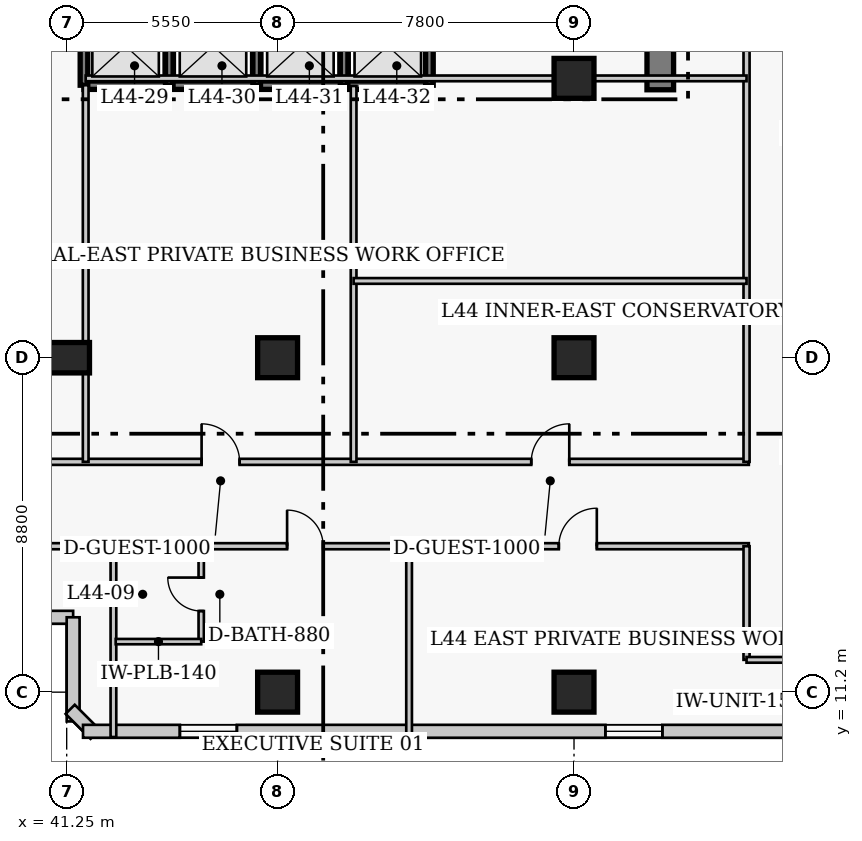
"""IFC4 building model, lengths in metres.
Left out: names, types, materials, properties, quantities, classifications, styles, units other than length and angle.
Written with IfcOpenShell. Run it as: python <this file> out.ifc"""

import sys

from ifc_helpers import new_model, si_unit, direction, frame, frame_2d, origin, origin_2d, place, context, subcontext, project, spatial, rectangle, extrude, element, fill, save


model = new_model("IFC4")
c1 = context("Model", 3, precision=1e-05, world=origin(), true_north=direction((0.0, 1.0)))
c2 = subcontext(c1, "Body", "Model", "MODEL_VIEW")
j1 = project(units=[si_unit("LENGTHUNIT", "METRE"), si_unit("PLANEANGLEUNIT", "RADIAN")], contexts=[c1])
p1 = place(None, origin())
s1 = spatial("IfcSite", under=j1, at=p1, CompositionType="ELEMENT")
p2 = place(p1, origin())
s2 = spatial("IfcBuilding", under=s1, at=p2, CompositionType="ELEMENT")
p3 = place(p2, frame((0.0, 0.0, 176.4)))
s3 = spatial("IfcBuildingStorey", under=s2, at=p3, CompositionType="ELEMENT", Elevation=176.4)
p4 = place(p3, frame((56.87, 27.05, 0.0), z_axis=(0.0, 0.0, 1.0), x_axis=(0.0, 1.0, 0.0)))
e1 = element("IfcWall", 1, at=p4, inside=s3, PredefinedType="SHEAR", context=c2, shape_type="SweptSolid", body=[
    extrude(rectangle(XDim=13.62, YDim=0.7, at=frame_2d((6.81, 0.0))), origin(), (0.0, 0.0, 1.0), 3.8),
])
p5 = place(p3, frame((41.25, 20.0, 0.0), z_axis=(0.0, 0.0, 1.0), x_axis=(1.0, 0.0, 0.0)))
e2 = element("IfcColumn", 2, at=p5, inside=s3, PredefinedType="COLUMN", context=c2, shape_type="SweptSolid", body=[
    extrude(rectangle(XDim=1.2, YDim=0.8, at=origin_2d()), origin(), (0.0, 0.0, 1.0), 3.8),
])
for number, where, z_axis, x_axis in (
    (3, (46.8, 11.2, 0.0), (0.0, 0.0, 1.0), (1.0, 0.0, 0.0)),
    (4, (46.8, 20.0, 0.0), (0.0, 0.0, 1.0), (1.0, 0.0, 0.0)),
    (5, (54.6, 11.2, 0.0), (0.0, 0.0, 1.0), (1.0, 0.0, 0.0)),
    (6, (54.6, 20.0, 0.0), (0.0, 0.0, 1.0), (1.0, 0.0, 0.0)),
    (7, (54.6, 27.35, 0.0), (0.0, 0.0, 1.0), (1.0, 0.0, 0.0)),
):
    element("IfcColumn", number, at=place(p3, frame(where, z_axis=z_axis, x_axis=x_axis)), inside=s3, PredefinedType="COLUMN", context=c2, shape_type="SweptSolid", body=[
        extrude(rectangle(XDim=1.05, YDim=1.05, at=origin_2d()), origin(), (0.0, 0.0, 1.0), 3.8),
    ])
p6 = place(p3, frame((36.58, 13.17, 0.0), z_axis=(0.0, 0.0, 1.0), x_axis=(1.0, 0.0, 0.0)))
e8 = element("IfcWall", 8, at=p6, inside=s3, PredefinedType="SOLIDWALL", context=c2, shape_type="SweptSolid", body=[
    extrude(rectangle(XDim=4.84, YDim=0.34, at=frame_2d((2.42, 0.0))), origin(), (0.0, 0.0, 1.0), 3.55),
])
p7 = place(p6, frame((1.67, 0.0, 0.85)))
e9 = element("IfcOpeningElement", 9, at=p7, cuts=e8, PredefinedType="OPENING", context=c2, shape_type="SweptSolid", body=[
    extrude(rectangle(XDim=1.5, YDim=1.75, at=frame_2d((0.75, 0.875))), frame((0.0, 0.18, 0.0), z_axis=(0.0, -1.0, 0.0), x_axis=(1.0, 0.0, 0.0)), (0.0, 0.0, 1.0), 0.36),
])
p8 = place(p3, frame((41.42, 13.17, 0.0), z_axis=(0.0, 0.0, 1.0), x_axis=(0.0, -1.0, 0.0)))
e10 = element("IfcWall", 10, at=p8, inside=s3, PredefinedType="SOLIDWALL", context=c2, shape_type="SweptSolid", body=[
    extrude(rectangle(XDim=2.74, YDim=0.34, at=frame_2d((1.37, 0.0))), origin(), (0.0, 0.0, 1.0), 3.55),
])
p9 = place(p3, frame((41.342, 10.749, 0.0), z_axis=(0.0, 0.0, 1.0), x_axis=(0.707106781187, -0.707106781187, 0.0)))
e11 = element("IfcWall", 11, at=p9, inside=s3, PredefinedType="SOLIDWALL", context=c2, shape_type="SweptSolid", body=[
    extrude(rectangle(XDim=0.929, YDim=0.34, at=frame_2d((0.464, 0.0))), origin(), (0.0, 0.0, 1.0), 3.55),
])
p10 = place(p3, frame((41.68, 10.17, 0.0), z_axis=(0.0, 0.0, 1.0), x_axis=(1.0, 0.0, 0.0)))
e12 = element("IfcWall", 12, at=p10, inside=s3, PredefinedType="SOLIDWALL", context=c2, shape_type="SweptSolid", body=[
    extrude(rectangle(XDim=26.69, YDim=0.34, at=frame_2d((13.345, 0.0))), origin(), (0.0, 0.0, 1.0), 3.55),
])
p11 = place(p10, frame((2.548, 0.0, 0.85)))
e13 = element("IfcOpeningElement", 13, at=p11, cuts=e12, PredefinedType="OPENING", context=c2, shape_type="SweptSolid", body=[
    extrude(rectangle(XDim=1.5, YDim=1.75, at=frame_2d((0.75, 0.875))), frame((0.0, 0.18, 0.0), z_axis=(0.0, -1.0, 0.0), x_axis=(1.0, 0.0, 0.0)), (0.0, 0.0, 1.0), 0.36),
])
p12 = place(p10, frame((13.745, 0.0, 0.85)))
e14 = element("IfcOpeningElement", 14, at=p12, cuts=e12, PredefinedType="OPENING", context=c2, shape_type="SweptSolid", body=[
    extrude(rectangle(XDim=1.5, YDim=1.75, at=frame_2d((0.75, 0.875))), frame((0.0, 0.18, 0.0), z_axis=(0.0, -1.0, 0.0), x_axis=(1.0, 0.0, 0.0)), (0.0, 0.0, 1.0), 0.36),
])
p13 = place(p10, frame((21.492, 0.0, 0.85)))
e15 = element("IfcOpeningElement", 15, at=p13, cuts=e12, PredefinedType="OPENING", context=c2, shape_type="SweptSolid", body=[
    extrude(rectangle(XDim=1.5, YDim=1.75, at=frame_2d((0.75, 0.875))), frame((0.0, 0.18, 0.0), z_axis=(0.0, -1.0, 0.0), x_axis=(1.0, 0.0, 0.0)), (0.0, 0.0, 1.0), 0.36),
])
p14 = place(p3, frame((41.705, 27.17, 0.0), z_axis=(0.0, 0.0, 1.0), x_axis=(1.0, 0.0, 0.0)))
e16 = element("IfcWall", 16, at=p14, inside=s3, PredefinedType="SHEAR", context=c2, shape_type="SweptSolid", body=[
    extrude(rectangle(XDim=2.245, YDim=0.22, at=frame_2d((1.123, 0.0))), origin(), (0.0, 0.0, 1.0), 3.8),
])
p15 = place(p3, frame((41.705, 27.17, 0.0), z_axis=(0.0, 0.0, 1.0), x_axis=(0.0, 1.0, 0.0)))
e17 = element("IfcWall", 17, at=p15, inside=s3, PredefinedType="SHEAR", context=c2, shape_type="SweptSolid", body=[
    extrude(rectangle(XDim=2.06, YDim=0.2, at=frame_2d((1.03, 0.0))), origin(), (0.0, 0.0, 1.0), 3.8),
])
p16 = place(p3, frame((43.95, 27.17, 0.0), z_axis=(0.0, 0.0, 1.0), x_axis=(1.0, 0.0, 0.0)))
e18 = element("IfcWall", 18, at=p16, inside=s3, PredefinedType="SHEAR", context=c2, shape_type="SweptSolid", body=[
    extrude(rectangle(XDim=2.3, YDim=0.22, at=frame_2d((1.15, 0.0))), origin(), (0.0, 0.0, 1.0), 3.8),
])
p17 = place(p3, frame((43.95, 27.17, 0.0), z_axis=(0.0, 0.0, 1.0), x_axis=(0.0, 1.0, 0.0)))
e19 = element("IfcWall", 19, at=p17, inside=s3, PredefinedType="SHEAR", context=c2, shape_type="SweptSolid", body=[
    extrude(rectangle(XDim=2.06, YDim=0.2, at=frame_2d((1.03, 0.0))), origin(), (0.0, 0.0, 1.0), 3.8),
])
p18 = place(p3, frame((46.25, 27.17, 0.0), z_axis=(0.0, 0.0, 1.0), x_axis=(1.0, 0.0, 0.0)))
e20 = element("IfcWall", 20, at=p18, inside=s3, PredefinedType="SHEAR", context=c2, shape_type="SweptSolid", body=[
    extrude(rectangle(XDim=2.3, YDim=0.22, at=frame_2d((1.15, 0.0))), origin(), (0.0, 0.0, 1.0), 3.8),
])
p19 = place(p3, frame((46.25, 27.17, 0.0), z_axis=(0.0, 0.0, 1.0), x_axis=(0.0, 1.0, 0.0)))
e21 = element("IfcWall", 21, at=p19, inside=s3, PredefinedType="SHEAR", context=c2, shape_type="SweptSolid", body=[
    extrude(rectangle(XDim=2.06, YDim=0.2, at=frame_2d((1.03, 0.0))), origin(), (0.0, 0.0, 1.0), 3.8),
])
p20 = place(p3, frame((48.55, 27.17, 0.0), z_axis=(0.0, 0.0, 1.0), x_axis=(1.0, 0.0, 0.0)))
e22 = element("IfcWall", 22, at=p20, inside=s3, PredefinedType="SHEAR", context=c2, shape_type="SweptSolid", body=[
    extrude(rectangle(XDim=2.245, YDim=0.22, at=frame_2d((1.123, 0.0))), origin(), (0.0, 0.0, 1.0), 3.8),
])
for number, where, z_axis, x_axis in (
    (23, (48.55, 27.17, 0.0), (0.0, 0.0, 1.0), (0.0, 1.0, 0.0)),
    (24, (50.795, 27.17, 0.0), (0.0, 0.0, 1.0), (0.0, 1.0, 0.0)),
):
    element("IfcWall", number, at=place(p3, frame(where, z_axis=z_axis, x_axis=x_axis)), inside=s3, PredefinedType="SHEAR", context=c2, shape_type="SweptSolid", body=[
        extrude(rectangle(XDim=2.06, YDim=0.2, at=frame_2d((1.03, 0.0))), origin(), (0.0, 0.0, 1.0), 3.8),
    ])
p21 = place(p3, frame((35.85, 17.26, 0.0), z_axis=(0.0, 0.0, 1.0), x_axis=(1.0, 0.0, 0.0)))
e25 = element("IfcWall", 25, at=p21, inside=s3, PredefinedType="PARTITIONING", context=c2, shape_type="SweptSolid", body=[
    extrude(rectangle(XDim=23.35, YDim=0.16, at=frame_2d((11.675, 0.0))), origin(), (0.0, 0.0, 1.0), 3.55),
])
p22 = place(p21, frame((8.95, 0.0, 0.0)))
e26 = element("IfcOpeningElement", 26, at=p22, cuts=e25, PredefinedType="OPENING", context=c2, shape_type="SweptSolid", body=[
    extrude(rectangle(XDim=1.0, YDim=2.15, at=frame_2d((0.5, 1.075))), frame((0.0, 0.09, 0.0), z_axis=(0.0, -1.0, 0.0), x_axis=(1.0, 0.0, 0.0)), (0.0, 0.0, 1.0), 0.18),
])
p23 = place(p21, frame((17.625, 0.0, 0.0)))
e27 = element("IfcOpeningElement", 27, at=p23, cuts=e25, PredefinedType="OPENING", context=c2, shape_type="SweptSolid", body=[
    extrude(rectangle(XDim=1.0, YDim=2.15, at=frame_2d((0.5, 1.075))), frame((0.0, 0.09, 0.0), z_axis=(0.0, -1.0, 0.0), x_axis=(1.0, 0.0, 0.0)), (0.0, 0.0, 1.0), 0.18),
])
p24 = place(p3, frame((35.8, 15.04, 0.0), z_axis=(0.0, 0.0, 1.0), x_axis=(1.0, 0.0, 0.0)))
e28 = element("IfcWall", 28, at=p24, inside=s3, PredefinedType="PARTITIONING", context=c2, shape_type="SweptSolid", body=[
    extrude(rectangle(XDim=23.4, YDim=0.16, at=frame_2d((11.7, 0.0))), origin(), (0.0, 0.0, 1.0), 3.55),
])
p25 = place(p24, frame((11.25, 0.0, 0.0)))
e29 = element("IfcOpeningElement", 29, at=p25, cuts=e28, PredefinedType="OPENING", context=c2, shape_type="SweptSolid", body=[
    extrude(rectangle(XDim=0.95, YDim=2.1, at=frame_2d((0.475, 1.05))), frame((0.0, 0.09, 0.0), z_axis=(0.0, -1.0, 0.0), x_axis=(1.0, 0.0, 0.0)), (0.0, 0.0, 1.0), 0.18),
])
p26 = place(p24, frame((18.4, 0.0, 0.0)))
e30 = element("IfcOpeningElement", 30, at=p26, cuts=e28, PredefinedType="OPENING", context=c2, shape_type="SweptSolid", body=[
    extrude(rectangle(XDim=1.0, YDim=2.15, at=frame_2d((0.5, 1.075))), frame((0.0, 0.09, 0.0), z_axis=(0.0, -1.0, 0.0), x_axis=(1.0, 0.0, 0.0)), (0.0, 0.0, 1.0), 0.18),
])
p27 = place(p3, frame((59.14, 17.26, 0.0), z_axis=(0.0, 0.0, 1.0), x_axis=(0.0, 1.0, 0.0)))
e31 = element("IfcWall", 31, at=p27, inside=s3, PredefinedType="PARTITIONING", context=c2, shape_type="SweptSolid", body=[
    extrude(rectangle(XDim=23.39, YDim=0.16, at=frame_2d((11.695, 0.0))), origin(), (0.0, 0.0, 1.0), 3.55),
])
p28 = place(p3, frame((59.14, 12.05, 0.0), z_axis=(0.0, 0.0, 1.0), x_axis=(0.0, 1.0, 0.0)))
e32 = element("IfcWall", 32, at=p28, inside=s3, PredefinedType="PARTITIONING", context=c2, shape_type="SweptSolid", body=[
    extrude(rectangle(XDim=2.99, YDim=0.16, at=frame_2d((1.495, 0.0))), origin(), (0.0, 0.0, 1.0), 3.55),
])
p29 = place(p3, frame((59.14, 12.05, 0.0), z_axis=(0.0, 0.0, 1.0), x_axis=(1.0, 0.0, 0.0)))
e33 = element("IfcWall", 33, at=p29, inside=s3, PredefinedType="PARTITIONING", context=c2, shape_type="SweptSolid", body=[
    extrude(rectangle(XDim=2.22, YDim=0.15, at=frame_2d((1.11, 0.0))), origin(), (0.0, 0.0, 1.0), 3.55),
])
p30 = place(p3, frame((41.75, 17.26, 0.0), z_axis=(0.0, 0.0, 1.0), x_axis=(0.0, 1.0, 0.0)))
e34 = element("IfcWall", 34, at=p30, inside=s3, PredefinedType="PARTITIONING", context=c2, shape_type="SweptSolid", body=[
    extrude(rectangle(XDim=9.91, YDim=0.15, at=frame_2d((4.955, 0.0))), origin(), (0.0, 0.0, 1.0), 3.55),
])
p31 = place(p3, frame((48.8, 17.26, 0.0), z_axis=(0.0, 0.0, 1.0), x_axis=(0.0, 1.0, 0.0)))
e35 = element("IfcWall", 35, at=p31, inside=s3, PredefinedType="PARTITIONING", context=c2, shape_type="SweptSolid", body=[
    extrude(rectangle(XDim=9.89, YDim=0.15, at=frame_2d((4.945, 0.0))), origin(), (0.0, 0.0, 1.0), 3.55),
])
p32 = place(p3, frame((41.75, 27.35, 0.0), z_axis=(0.0, 0.0, 1.0), x_axis=(1.0, 0.0, 0.0)))
e36 = element("IfcWall", 36, at=p32, inside=s3, PredefinedType="PARTITIONING", context=c2, shape_type="SweptSolid", body=[
    extrude(rectangle(XDim=17.39, YDim=0.15, at=frame_2d((8.695, 0.0))), origin(), (0.0, 0.0, 1.0), 3.55),
])
p33 = place(p3, frame((48.8, 22.02, 0.0), z_axis=(0.0, 0.0, 1.0), x_axis=(1.0, 0.0, 0.0)))
e37 = element("IfcWall", 37, at=p33, inside=s3, PredefinedType="PARTITIONING", context=c2, shape_type="SweptSolid", body=[
    extrude(rectangle(XDim=10.34, YDim=0.15, at=frame_2d((5.17, 0.0))), origin(), (0.0, 0.0, 1.0), 3.55),
])
p34 = place(p3, frame((42.48, 10.02, 0.0), z_axis=(0.0, 0.0, 1.0), x_axis=(0.0, 1.0, 0.0)))
e38 = element("IfcWall", 38, at=p34, inside=s3, PredefinedType="PARTITIONING", context=c2, shape_type="SweptSolid", body=[
    extrude(rectangle(XDim=5.02, YDim=0.15, at=frame_2d((2.51, 0.0))), origin(), (0.0, 0.0, 1.0), 3.55),
])
p35 = place(p3, frame((44.79, 12.53, 0.0), z_axis=(0.0, 0.0, 1.0), x_axis=(0.0, 1.0, 0.0)))
e39 = element("IfcWall", 39, at=p35, inside=s3, PredefinedType="PLUMBINGWALL", context=c2, shape_type="SweptSolid", body=[
    extrude(rectangle(XDim=2.49, YDim=0.14, at=frame_2d((1.245, 0.0))), origin(), (0.0, 0.0, 1.0), 3.55),
])
p36 = place(p35, frame((0.805, 0.0, 0.0)))
e40 = element("IfcOpeningElement", 40, at=p36, cuts=e39, PredefinedType="OPENING", context=c2, shape_type="SweptSolid", body=[
    extrude(rectangle(XDim=0.88, YDim=2.05, at=frame_2d((0.44, 1.025))), frame((0.0, 0.08, 0.0), z_axis=(0.0, -1.0, 0.0), x_axis=(1.0, 0.0, 0.0)), (0.0, 0.0, 1.0), 0.16),
])
p37 = place(p3, frame((42.54, 12.53, 0.0), z_axis=(0.0, 0.0, 1.0), x_axis=(1.0, 0.0, 0.0)))
e41 = element("IfcWall", 41, at=p37, inside=s3, PredefinedType="PLUMBINGWALL", context=c2, shape_type="SweptSolid", body=[
    extrude(rectangle(XDim=2.25, YDim=0.14, at=frame_2d((1.125, 0.0))), origin(), (0.0, 0.0, 1.0), 3.55),
])
p38 = place(p3, frame((50.26, 10.02, 0.0), z_axis=(0.0, 0.0, 1.0), x_axis=(0.0, 1.0, 0.0)))
e42 = element("IfcWall", 42, at=p38, inside=s3, PredefinedType="PARTITIONING", context=c2, shape_type="SweptSolid", body=[
    extrude(rectangle(XDim=5.02, YDim=0.15, at=frame_2d((2.51, 0.0))), origin(), (0.0, 0.0, 1.0), 3.55),
])
p39 = place(p11, origin())
e43 = element("IfcWindow", 43, at=p39, inside=s3, PartitioningType="SINGLE_PANEL", PredefinedType="WINDOW", context=c2, shape_type="SweptSolid", body=[
    extrude(rectangle(XDim=1.5, YDim=1.75, at=frame_2d((0.75, 0.875))), frame((0.0, 0.03, 0.0), z_axis=(0.0, -1.0, 0.0), x_axis=(1.0, 0.0, 0.0)), (0.0, 0.0, 1.0), 0.06),
])
fill(e13, e43)
p40 = place(p12, origin())
e44 = element("IfcWindow", 44, at=p40, inside=s3, PartitioningType="SINGLE_PANEL", PredefinedType="WINDOW", context=c2, shape_type="SweptSolid", body=[
    extrude(rectangle(XDim=1.5, YDim=1.75, at=frame_2d((0.75, 0.875))), frame((0.0, 0.03, 0.0), z_axis=(0.0, -1.0, 0.0), x_axis=(1.0, 0.0, 0.0)), (0.0, 0.0, 1.0), 0.06),
])
fill(e14, e44)
p41 = place(p22, origin())
e45 = element("IfcDoor", 45, at=p41, inside=s3, OperationType="SINGLE_SWING_LEFT", PredefinedType="DOOR", context=c2, shape_type="SweptSolid", body=[
    extrude(rectangle(XDim=1.0, YDim=2.15, at=frame_2d((0.5, 1.075))), frame((0.0, 0.025, 0.0), z_axis=(0.0, -1.0, 0.0), x_axis=(1.0, 0.0, 0.0)), (0.0, 0.0, 1.0), 0.05),
])
fill(e26, e45)
p42 = place(p23, origin())
e46 = element("IfcDoor", 46, at=p42, inside=s3, OperationType="SINGLE_SWING_RIGHT", PredefinedType="DOOR", context=c2, shape_type="SweptSolid", body=[
    extrude(rectangle(XDim=1.0, YDim=2.15, at=frame_2d((0.5, 1.075))), frame((0.0, 0.025, 0.0), z_axis=(0.0, -1.0, 0.0), x_axis=(1.0, 0.0, 0.0)), (0.0, 0.0, 1.0), 0.05),
])
fill(e27, e46)
p43 = place(p36, origin())
e47 = element("IfcDoor", 47, at=p43, inside=s3, OperationType="SINGLE_SWING_RIGHT", PredefinedType="DOOR", context=c2, shape_type="SweptSolid", body=[
    extrude(rectangle(XDim=0.88, YDim=2.05, at=frame_2d((0.44, 1.025))), frame((0.0, 0.025, 0.0), z_axis=(0.0, -1.0, 0.0), x_axis=(1.0, 0.0, 0.0)), (0.0, 0.0, 1.0), 0.05),
])
fill(e40, e47)
p44 = place(p25, origin())
e48 = element("IfcDoor", 48, at=p44, inside=s3, OperationType="SINGLE_SWING_LEFT", PredefinedType="DOOR", context=c2, shape_type="SweptSolid", body=[
    extrude(rectangle(XDim=0.95, YDim=2.1, at=frame_2d((0.475, 1.05))), frame((0.0, 0.025, 0.0), z_axis=(0.0, -1.0, 0.0), x_axis=(1.0, 0.0, 0.0)), (0.0, 0.0, 1.0), 0.05),
])
fill(e29, e48)
p45 = place(p26, origin())
e49 = element("IfcDoor", 49, at=p45, inside=s3, OperationType="SINGLE_SWING_RIGHT", PredefinedType="DOOR", context=c2, shape_type="SweptSolid", body=[
    extrude(rectangle(XDim=1.0, YDim=2.15, at=frame_2d((0.5, 1.075))), frame((0.0, 0.025, 0.0), z_axis=(0.0, -1.0, 0.0), x_axis=(1.0, 0.0, 0.0)), (0.0, 0.0, 1.0), 0.05),
])
fill(e30, e49)
save(model, sys.argv[1])
